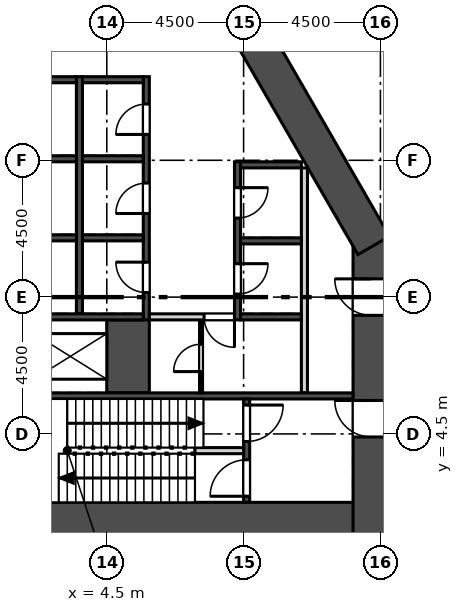
"""IFC4 building model, lengths in metres.
Left out: names, types, materials, properties, quantities, classifications, styles, units other than length and angle.
Written with IfcOpenShell. Run it as: python <this file> out.ifc"""

import sys

from ifc_helpers import new_model, si_unit, direction, frame, frame_2d, origin, place, context, subcontext, project, spatial, rectangle, extrude, element, fill, save


model = new_model("IFC4")
c1 = context("Model", 3, precision=1e-05, world=origin(), true_north=direction((0.0, 1.0)))
c2 = subcontext(c1, "Body", "Model", "MODEL_VIEW")
j1 = project(units=[si_unit("LENGTHUNIT", "METRE"), si_unit("PLANEANGLEUNIT", "RADIAN")], contexts=[c1])
p1 = place(None, origin())
s1 = spatial("IfcSite", under=j1, at=p1, CompositionType="ELEMENT")
p2 = place(p1, origin())
s2 = spatial("IfcBuilding", under=s1, at=p2, CompositionType="ELEMENT")
p3 = place(p2, frame((0.0, 0.0, 132.1)))
s3 = spatial("IfcBuildingStorey", under=s2, at=p3, CompositionType="ELEMENT", Elevation=132.1)
p4 = place(p3, frame((-13.8, 1.65, 0.0), z_axis=(0.0, 0.0, 1.0), x_axis=(1.0, 0.0, 0.0)))
e1 = element("IfcWall", 1, at=p4, inside=s3, PredefinedType="SHEAR", context=c2, shape_type="SweptSolid", body=[
    extrude(rectangle(XDim=27.6, YDim=1.2, at=frame_2d((13.8, 0.0))), origin(), (0.0, 0.0, 1.0), 5.4),
])
p5 = place(p3, frame((13.2, 1.05, 0.0), z_axis=(0.0, 0.0, 1.0), x_axis=(0.0, 1.0, 0.0)))
e2 = element("IfcWall", 2, at=p5, inside=s3, PredefinedType="SHEAR", context=c2, shape_type="SweptSolid", body=[
    extrude(rectangle(XDim=9.949, YDim=1.2, at=frame_2d((4.975, 0.0))), origin(), (0.0, 0.0, 1.0), 5.4),
])
p6 = place(p5, frame((3.35, 0.0, 0.0)))
e3 = element("IfcOpeningElement", 3, at=p6, cuts=e2, PredefinedType="OPENING", context=c2, shape_type="SweptSolid", body=[
    extrude(rectangle(XDim=1.2, YDim=2.1, at=frame_2d((0.6, 1.05))), frame((0.0, 0.61, 0.0), z_axis=(0.0, -1.0, 0.0), x_axis=(1.0, 0.0, 0.0)), (0.0, 0.0, 1.0), 1.22),
])
p7 = place(p5, frame((7.35, 0.0, 0.0)))
e4 = element("IfcOpeningElement", 4, at=p7, cuts=e2, PredefinedType="OPENING", context=c2, shape_type="SweptSolid", body=[
    extrude(rectangle(XDim=1.2, YDim=2.1, at=frame_2d((0.6, 1.05))), frame((0.0, 0.61, 0.0), z_axis=(0.0, -1.0, 0.0), x_axis=(1.0, 0.0, 0.0)), (0.0, 0.0, 1.0), 1.22),
])
p8 = place(p3, frame((13.281, 10.699, 0.0), z_axis=(0.0, 0.0, 1.0), x_axis=(-0.499998513025, 0.866026262288, 0.0)))
e5 = element("IfcWall", 5, at=p8, inside=s3, PredefinedType="SHEAR", context=c2, shape_type="SweptSolid", body=[
    extrude(rectangle(XDim=9.008, YDim=1.2, at=frame_2d((4.504, 0.0))), origin(), (0.0, 0.0, 1.0), 5.4),
])
p9 = place(p3, frame((29.746, 7.709, 0.0), z_axis=(0.0, 0.0, 1.0), x_axis=(-0.500000700546, 0.866024999324, 0.0)))
e6 = element("IfcWall", 6, at=p9, inside=s3, PredefinedType="SOLIDWALL", context=c2, shape_type="SweptSolid", body=[
    extrude(rectangle(XDim=50.787, YDim=0.34, at=frame_2d((25.393, 0.0))), origin(), (0.0, 0.0, 1.0), 5.0),
])
p10 = place(p9, frame((3.197, 0.0, 0.9)))
e7 = element("IfcOpeningElement", 7, at=p10, cuts=e6, PredefinedType="OPENING", context=c2, shape_type="SweptSolid", body=[
    extrude(rectangle(XDim=1.885, YDim=3.0, at=frame_2d((0.942, 1.5))), frame((0.0, 0.18, 0.0), z_axis=(0.0, -1.0, 0.0), x_axis=(1.0, 0.0, 0.0)), (0.0, 0.0, 1.0), 0.36),
])
p11 = place(p9, frame((6.197, 0.0, 0.9)))
e8 = element("IfcOpeningElement", 8, at=p11, cuts=e6, PredefinedType="OPENING", context=c2, shape_type="SweptSolid", body=[
    extrude(rectangle(XDim=1.885, YDim=3.0, at=frame_2d((0.942, 1.5))), frame((0.0, 0.18, 0.0), z_axis=(0.0, -1.0, 0.0), x_axis=(1.0, 0.0, 0.0)), (0.0, 0.0, 1.0), 0.36),
])
p12 = place(p9, frame((9.197, 0.0, 0.9)))
e9 = element("IfcOpeningElement", 9, at=p12, cuts=e6, PredefinedType="OPENING", context=c2, shape_type="SweptSolid", body=[
    extrude(rectangle(XDim=1.885, YDim=3.0, at=frame_2d((0.942, 1.5))), frame((0.0, 0.18, 0.0), z_axis=(0.0, -1.0, 0.0), x_axis=(1.0, 0.0, 0.0)), (0.0, 0.0, 1.0), 0.36),
])
p13 = place(p9, frame((12.197, 0.0, 0.9)))
e10 = element("IfcOpeningElement", 10, at=p13, cuts=e6, PredefinedType="OPENING", context=c2, shape_type="SweptSolid", body=[
    extrude(rectangle(XDim=1.885, YDim=3.0, at=frame_2d((0.942, 1.5))), frame((0.0, 0.18, 0.0), z_axis=(0.0, -1.0, 0.0), x_axis=(1.0, 0.0, 0.0)), (0.0, 0.0, 1.0), 0.36),
])
p14 = place(p9, frame((15.197, 0.0, 0.9)))
e11 = element("IfcOpeningElement", 11, at=p14, cuts=e6, PredefinedType="OPENING", context=c2, shape_type="SweptSolid", body=[
    extrude(rectangle(XDim=1.885, YDim=3.0, at=frame_2d((0.942, 1.5))), frame((0.0, 0.18, 0.0), z_axis=(0.0, -1.0, 0.0), x_axis=(1.0, 0.0, 0.0)), (0.0, 0.0, 1.0), 0.36),
])
p15 = place(p9, frame((18.197, 0.0, 0.9)))
e12 = element("IfcOpeningElement", 12, at=p15, cuts=e6, PredefinedType="OPENING", context=c2, shape_type="SweptSolid", body=[
    extrude(rectangle(XDim=1.885, YDim=3.0, at=frame_2d((0.942, 1.5))), frame((0.0, 0.18, 0.0), z_axis=(0.0, -1.0, 0.0), x_axis=(1.0, 0.0, 0.0)), (0.0, 0.0, 1.0), 0.36),
])
p16 = place(p9, frame((21.197, 0.0, 0.9)))
e13 = element("IfcOpeningElement", 13, at=p16, cuts=e6, PredefinedType="OPENING", context=c2, shape_type="SweptSolid", body=[
    extrude(rectangle(XDim=1.885, YDim=3.0, at=frame_2d((0.942, 1.5))), frame((0.0, 0.18, 0.0), z_axis=(0.0, -1.0, 0.0), x_axis=(1.0, 0.0, 0.0)), (0.0, 0.0, 1.0), 0.36),
])
p17 = place(p9, frame((24.197, 0.0, 0.9)))
e14 = element("IfcOpeningElement", 14, at=p17, cuts=e6, PredefinedType="OPENING", context=c2, shape_type="SweptSolid", body=[
    extrude(rectangle(XDim=1.885, YDim=3.0, at=frame_2d((0.942, 1.5))), frame((0.0, 0.18, 0.0), z_axis=(0.0, -1.0, 0.0), x_axis=(1.0, 0.0, 0.0)), (0.0, 0.0, 1.0), 0.36),
])
p18 = place(p9, frame((27.197, 0.0, 0.9)))
e15 = element("IfcOpeningElement", 15, at=p18, cuts=e6, PredefinedType="OPENING", context=c2, shape_type="SweptSolid", body=[
    extrude(rectangle(XDim=1.885, YDim=3.0, at=frame_2d((0.942, 1.5))), frame((0.0, 0.18, 0.0), z_axis=(0.0, -1.0, 0.0), x_axis=(1.0, 0.0, 0.0)), (0.0, 0.0, 1.0), 0.36),
])
p19 = place(p9, frame((30.197, 0.0, 0.9)))
e16 = element("IfcOpeningElement", 16, at=p19, cuts=e6, PredefinedType="OPENING", context=c2, shape_type="SweptSolid", body=[
    extrude(rectangle(XDim=1.885, YDim=3.0, at=frame_2d((0.942, 1.5))), frame((0.0, 0.18, 0.0), z_axis=(0.0, -1.0, 0.0), x_axis=(1.0, 0.0, 0.0)), (0.0, 0.0, 1.0), 0.36),
])
p20 = place(p9, frame((33.197, 0.0, 0.9)))
e17 = element("IfcOpeningElement", 17, at=p20, cuts=e6, PredefinedType="OPENING", context=c2, shape_type="SweptSolid", body=[
    extrude(rectangle(XDim=1.885, YDim=3.0, at=frame_2d((0.942, 1.5))), frame((0.0, 0.18, 0.0), z_axis=(0.0, -1.0, 0.0), x_axis=(1.0, 0.0, 0.0)), (0.0, 0.0, 1.0), 0.36),
])
p21 = place(p9, frame((36.197, 0.0, 0.9)))
e18 = element("IfcOpeningElement", 18, at=p21, cuts=e6, PredefinedType="OPENING", context=c2, shape_type="SweptSolid", body=[
    extrude(rectangle(XDim=1.885, YDim=3.0, at=frame_2d((0.942, 1.5))), frame((0.0, 0.18, 0.0), z_axis=(0.0, -1.0, 0.0), x_axis=(1.0, 0.0, 0.0)), (0.0, 0.0, 1.0), 0.36),
])
p22 = place(p9, frame((39.197, 0.0, 0.9)))
e19 = element("IfcOpeningElement", 19, at=p22, cuts=e6, PredefinedType="OPENING", context=c2, shape_type="SweptSolid", body=[
    extrude(rectangle(XDim=1.885, YDim=3.0, at=frame_2d((0.942, 1.5))), frame((0.0, 0.18, 0.0), z_axis=(0.0, -1.0, 0.0), x_axis=(1.0, 0.0, 0.0)), (0.0, 0.0, 1.0), 0.36),
])
p23 = place(p9, frame((42.197, 0.0, 0.9)))
e20 = element("IfcOpeningElement", 20, at=p23, cuts=e6, PredefinedType="OPENING", context=c2, shape_type="SweptSolid", body=[
    extrude(rectangle(XDim=1.885, YDim=3.0, at=frame_2d((0.942, 1.5))), frame((0.0, 0.18, 0.0), z_axis=(0.0, -1.0, 0.0), x_axis=(1.0, 0.0, 0.0)), (0.0, 0.0, 1.0), 0.36),
])
p24 = place(p9, frame((45.197, 0.0, 0.9)))
e21 = element("IfcOpeningElement", 21, at=p24, cuts=e6, PredefinedType="OPENING", context=c2, shape_type="SweptSolid", body=[
    extrude(rectangle(XDim=1.885, YDim=3.0, at=frame_2d((0.942, 1.5))), frame((0.0, 0.18, 0.0), z_axis=(0.0, -1.0, 0.0), x_axis=(1.0, 0.0, 0.0)), (0.0, 0.0, 1.0), 0.36),
])
p25 = place(p3, frame((11.0, 5.85, 0.0), z_axis=(0.0, 0.0, 1.0), x_axis=(0.0, 1.0, 0.0)))
e22 = element("IfcWall", 22, at=p25, inside=s3, PredefinedType="SOLIDWALL", context=c2, shape_type="SweptSolid", body=[
    extrude(rectangle(XDim=7.4, YDim=0.2, at=frame_2d((3.7, 0.0))), origin(), (0.0, 0.0, 1.0), 5.0),
])
p26 = place(p3, frame((8.8, 8.25, -0.4), z_axis=(0.0, 0.0, 1.0), x_axis=(0.0, 1.0, 0.0)))
e23 = element("IfcWall", 23, at=p26, inside=s3, PredefinedType="SOLIDWALL", context=c2, shape_type="SweptSolid", body=[
    extrude(rectangle(XDim=5.2, YDim=0.2, at=frame_2d((2.6, 0.0))), origin(), (0.0, 0.0, 1.0), 5.4),
])
p27 = place(p26, frame((0.85, 0.0, 0.4)))
e24 = element("IfcOpeningElement", 24, at=p27, cuts=e23, PredefinedType="OPENING", context=c2, shape_type="SweptSolid", body=[
    extrude(rectangle(XDim=1.0, YDim=2.1, at=frame_2d((0.5, 1.05))), frame((0.0, 0.11, 0.0), z_axis=(0.0, -1.0, 0.0), x_axis=(1.0, 0.0, 0.0)), (0.0, 0.0, 1.0), 0.22),
])
p28 = place(p26, frame((3.35, 0.0, 0.4)))
e25 = element("IfcOpeningElement", 25, at=p28, cuts=e23, PredefinedType="OPENING", context=c2, shape_type="SweptSolid", body=[
    extrude(rectangle(XDim=1.0, YDim=2.1, at=frame_2d((0.5, 1.05))), frame((0.0, 0.11, 0.0), z_axis=(0.0, -1.0, 0.0), x_axis=(1.0, 0.0, 0.0)), (0.0, 0.0, 1.0), 0.22),
])
p29 = place(p3, frame((5.8, 8.25, -0.4), z_axis=(0.0, 0.0, 1.0), x_axis=(0.0, 1.0, 0.0)))
e26 = element("IfcWall", 26, at=p29, inside=s3, PredefinedType="SOLIDWALL", context=c2, shape_type="SweptSolid", body=[
    extrude(rectangle(XDim=8.0, YDim=0.2, at=frame_2d((4.0, 0.0))), origin(), (0.0, 0.0, 1.0), 5.4),
])
p30 = place(p29, frame((0.9, 0.0, 0.4)))
e27 = element("IfcOpeningElement", 27, at=p30, cuts=e26, PredefinedType="OPENING", context=c2, shape_type="SweptSolid", body=[
    extrude(rectangle(XDim=1.0, YDim=2.1, at=frame_2d((0.5, 1.05))), frame((0.0, 0.11, 0.0), z_axis=(0.0, -1.0, 0.0), x_axis=(1.0, 0.0, 0.0)), (0.0, 0.0, 1.0), 0.22),
])
p31 = place(p29, frame((3.5, 0.0, 0.4)))
e28 = element("IfcOpeningElement", 28, at=p31, cuts=e26, PredefinedType="OPENING", context=c2, shape_type="SweptSolid", body=[
    extrude(rectangle(XDim=1.0, YDim=2.1, at=frame_2d((0.5, 1.05))), frame((0.0, 0.11, 0.0), z_axis=(0.0, -1.0, 0.0), x_axis=(1.0, 0.0, 0.0)), (0.0, 0.0, 1.0), 0.22),
])
p32 = place(p29, frame((6.1, 0.0, 0.4)))
e29 = element("IfcOpeningElement", 29, at=p32, cuts=e26, PredefinedType="OPENING", context=c2, shape_type="SweptSolid", body=[
    extrude(rectangle(XDim=1.0, YDim=2.1, at=frame_2d((0.5, 1.05))), frame((0.0, 0.11, 0.0), z_axis=(0.0, -1.0, 0.0), x_axis=(1.0, 0.0, 0.0)), (0.0, 0.0, 1.0), 0.22),
])
p33 = place(p3, frame((3.6, 8.45, -0.4), z_axis=(0.0, 0.0, 1.0), x_axis=(0.0, 1.0, 0.0)))
e30 = element("IfcWall", 30, at=p33, inside=s3, PredefinedType="SOLIDWALL", context=c2, shape_type="SweptSolid", body=[
    extrude(rectangle(XDim=7.8, YDim=0.2, at=frame_2d((3.9, 0.0))), origin(), (0.0, 0.0, 1.0), 5.4),
])
p34 = place(p3, frame((5.2, 5.85, -0.4), z_axis=(0.0, 0.0, 1.0), x_axis=(0.0, 1.0, 0.0)))
e31 = element("IfcWall", 31, at=p34, inside=s3, PredefinedType="SOLIDWALL", context=c2, shape_type="SweptSolid", body=[
    extrude(rectangle(XDim=2.4, YDim=1.4, at=frame_2d((1.2, 0.0))), origin(), (0.0, 0.0, 1.0), 5.4),
])
p35 = place(p3, frame((8.9, 8.35, -0.4), z_axis=(0.0, 0.0, 1.0), x_axis=(1.0, 0.0, 0.0)))
e32 = element("IfcWall", 32, at=p35, inside=s3, PredefinedType="SOLIDWALL", context=c2, shape_type="SweptSolid", body=[
    extrude(rectangle(XDim=2.0, YDim=0.2, at=frame_2d((1.0, 0.0))), origin(), (0.0, 0.0, 1.0), 5.4),
])
p36 = place(p3, frame((1.5, 8.35, -0.4), z_axis=(0.0, 0.0, 1.0), x_axis=(1.0, 0.0, 0.0)))
e33 = element("IfcWall", 33, at=p36, inside=s3, PredefinedType="SOLIDWALL", context=c2, shape_type="SweptSolid", body=[
    extrude(rectangle(XDim=4.2, YDim=0.2, at=frame_2d((2.1, 0.0))), origin(), (0.0, 0.0, 1.0), 5.4),
])
p37 = place(p3, frame((1.2, 5.75, -0.4), z_axis=(0.0, 0.0, 1.0), x_axis=(1.0, 0.0, 0.0)))
e34 = element("IfcWall", 34, at=p37, inside=s3, PredefinedType="SOLIDWALL", context=c2, shape_type="SweptSolid", body=[
    extrude(rectangle(XDim=11.4, YDim=0.2, at=frame_2d((5.7, 0.0))), origin(), (0.0, 0.0, 1.0), 5.4),
])
p38 = place(p3, frame((9.1, 2.25, -0.4), z_axis=(0.0, 0.0, 1.0), x_axis=(0.0, 1.0, 0.0)))
e35 = element("IfcWall", 35, at=p38, inside=s3, PredefinedType="SOLIDWALL", context=c2, shape_type="SweptSolid", body=[
    extrude(rectangle(XDim=3.4, YDim=0.2, at=frame_2d((1.7, 0.0))), origin(), (0.0, 0.0, 1.0), 5.4),
])
p39 = place(p38, frame((0.2, 0.0, 0.4)))
e36 = element("IfcOpeningElement", 36, at=p39, cuts=e35, PredefinedType="OPENING", context=c2, shape_type="SweptSolid", body=[
    extrude(rectangle(XDim=1.2, YDim=2.1, at=frame_2d((0.6, 1.05))), frame((0.0, 0.11, 0.0), z_axis=(0.0, -1.0, 0.0), x_axis=(1.0, 0.0, 0.0)), (0.0, 0.0, 1.0), 0.22),
])
p40 = place(p38, frame((2.0, 0.0, 0.4)))
e37 = element("IfcOpeningElement", 37, at=p40, cuts=e35, PredefinedType="OPENING", context=c2, shape_type="SweptSolid", body=[
    extrude(rectangle(XDim=1.2, YDim=2.1, at=frame_2d((0.6, 1.05))), frame((0.0, 0.11, 0.0), z_axis=(0.0, -1.0, 0.0), x_axis=(1.0, 0.0, 0.0)), (0.0, 0.0, 1.0), 0.22),
])
for number, where, z_axis, x_axis in (
    (38, (8.9, 10.85, -0.4), (0.0, 0.0, 1.0), (1.0, 0.0, 0.0)),
    (39, (8.9, 13.35, -0.4), (0.0, 0.0, 1.0), (1.0, 0.0, 0.0)),
    (40, (3.7, 10.95, -0.4), (0.0, 0.0, 1.0), (1.0, 0.0, 0.0)),
    (41, (3.7, 13.55, -0.4), (0.0, 0.0, 1.0), (1.0, 0.0, 0.0)),
    (42, (3.7, 16.15, -0.4), (0.0, 0.0, 1.0), (1.0, 0.0, 0.0)),
    (43, (1.5, 10.95, -0.4), (0.0, 0.0, 1.0), (1.0, 0.0, 0.0)),
    (44, (1.5, 13.55, -0.4), (0.0, 0.0, 1.0), (1.0, 0.0, 0.0)),
    (45, (1.5, 16.15, -0.4), (0.0, 0.0, 1.0), (1.0, 0.0, 0.0)),
):
    element("IfcWall", number, at=place(p3, frame(where, z_axis=z_axis, x_axis=x_axis)), inside=s3, PredefinedType="SOLIDWALL", context=c2, shape_type="SweptSolid", body=[
        extrude(rectangle(XDim=2.0, YDim=0.2, at=frame_2d((1.0, 0.0))), origin(), (0.0, 0.0, 1.0), 5.4),
    ])
p41 = place(p3, frame((7.6, 5.85, 0.0), z_axis=(0.0, 0.0, 1.0), x_axis=(0.0, 1.0, 0.0)))
e46 = element("IfcWall", 46, at=p41, inside=s3, PredefinedType="PARTITIONING", context=c2, shape_type="SweptSolid", body=[
    extrude(rectangle(XDim=2.4, YDim=0.1, at=frame_2d((1.2, 0.0))), origin(), (0.0, 0.0, 1.0), 5.0),
])
p42 = place(p41, frame((0.7, 0.0, 0.0)))
e47 = element("IfcOpeningElement", 47, at=p42, cuts=e46, PredefinedType="OPENING", context=c2, shape_type="SweptSolid", body=[
    extrude(rectangle(XDim=0.9, YDim=2.1, at=frame_2d((0.45, 1.05))), frame((0.0, 0.06, 0.0), z_axis=(0.0, -1.0, 0.0), x_axis=(1.0, 0.0, 0.0)), (0.0, 0.0, 1.0), 0.12),
])
p43 = place(p3, frame((5.9, 8.35, 0.0), z_axis=(0.0, 0.0, 1.0), x_axis=(1.0, 0.0, 0.0)))
e48 = element("IfcWall", 48, at=p43, inside=s3, PredefinedType="SOLIDWALL", context=c2, shape_type="SweptSolid", body=[
    extrude(rectangle(XDim=2.8, YDim=0.2, at=frame_2d((1.4, 0.0))), origin(), (0.0, 0.0, 1.0), 5.0),
])
p44 = place(p43, frame((1.8, 0.0, 0.0)))
e49 = element("IfcOpeningElement", 49, at=p44, cuts=e48, PredefinedType="OPENING", context=c2, shape_type="SweptSolid", body=[
    extrude(rectangle(XDim=1.0, YDim=2.1, at=frame_2d((0.5, 1.05))), frame((0.0, 0.11, 0.0), z_axis=(0.0, -1.0, 0.0), x_axis=(1.0, 0.0, 0.0)), (0.0, 0.0, 1.0), 0.22),
])
p45 = place(p3, frame((7.4, 3.95, 0.0), z_axis=(0.0, 0.0, 1.0), x_axis=(1.0, 0.0, 0.0)))
e50 = element("IfcWall", 50, at=p45, inside=s3, PredefinedType="SOLIDWALL", context=c2, shape_type="SweptSolid", body=[
    extrude(rectangle(XDim=1.6, YDim=0.2, at=frame_2d((0.8, 0.0))), origin(), (0.0, 0.0, 1.0), 5.0),
])
p46 = place(p3, frame((11.621, 22.474, 0.0), z_axis=(0.0, 0.0, 1.0), x_axis=(0.499991059272, -0.866030565655, 0.0)))
e51 = element("IfcWall", 51, at=p46, inside=s3, PredefinedType="SOLIDWALL", context=c2, shape_type="SweptSolid", body=[
    extrude(rectangle(XDim=11.854, YDim=0.3, at=frame_2d((5.927, 0.0))), origin(), (0.0, 0.0, 1.0), 5.0),
])
p47 = place(p27, frame((1.0, 0.0, 0.0), z_axis=(0.0, 0.0, 1.0), x_axis=(-1.0, 0.0, 0.0)))
e52 = element("IfcDoor", 52, at=p47, inside=s3, OperationType="SINGLE_SWING_LEFT", PredefinedType="DOOR", context=c2, shape_type="SweptSolid", body=[
    extrude(rectangle(XDim=1.0, YDim=2.1, at=frame_2d((0.5, 1.05))), frame((0.0, 0.025, 0.0), z_axis=(0.0, -1.0, 0.0), x_axis=(1.0, 0.0, 0.0)), (0.0, 0.0, 1.0), 0.05),
])
fill(e24, e52)
p48 = place(p28, frame((1.0, 0.0, 0.0), z_axis=(0.0, 0.0, 1.0), x_axis=(-1.0, 0.0, 0.0)))
e53 = element("IfcDoor", 53, at=p48, inside=s3, OperationType="SINGLE_SWING_LEFT", PredefinedType="DOOR", context=c2, shape_type="SweptSolid", body=[
    extrude(rectangle(XDim=1.0, YDim=2.1, at=frame_2d((0.5, 1.05))), frame((0.0, 0.025, 0.0), z_axis=(0.0, -1.0, 0.0), x_axis=(1.0, 0.0, 0.0)), (0.0, 0.0, 1.0), 0.05),
])
fill(e25, e53)
p49 = place(p30, origin())
e54 = element("IfcDoor", 54, at=p49, inside=s3, OperationType="SINGLE_SWING_RIGHT", PredefinedType="DOOR", context=c2, shape_type="SweptSolid", body=[
    extrude(rectangle(XDim=1.0, YDim=2.1, at=frame_2d((0.5, 1.05))), frame((0.0, 0.025, 0.0), z_axis=(0.0, -1.0, 0.0), x_axis=(1.0, 0.0, 0.0)), (0.0, 0.0, 1.0), 0.05),
])
fill(e27, e54)
p50 = place(p31, origin())
e55 = element("IfcDoor", 55, at=p50, inside=s3, OperationType="SINGLE_SWING_LEFT", PredefinedType="DOOR", context=c2, shape_type="SweptSolid", body=[
    extrude(rectangle(XDim=1.0, YDim=2.1, at=frame_2d((0.5, 1.05))), frame((0.0, 0.025, 0.0), z_axis=(0.0, -1.0, 0.0), x_axis=(1.0, 0.0, 0.0)), (0.0, 0.0, 1.0), 0.05),
])
fill(e28, e55)
p51 = place(p32, origin())
e56 = element("IfcDoor", 56, at=p51, inside=s3, OperationType="SINGLE_SWING_LEFT", PredefinedType="DOOR", context=c2, shape_type="SweptSolid", body=[
    extrude(rectangle(XDim=1.0, YDim=2.1, at=frame_2d((0.5, 1.05))), frame((0.0, 0.025, 0.0), z_axis=(0.0, -1.0, 0.0), x_axis=(1.0, 0.0, 0.0)), (0.0, 0.0, 1.0), 0.05),
])
fill(e29, e56)
p52 = place(p44, frame((1.0, 0.0, 0.0), z_axis=(0.0, 0.0, 1.0), x_axis=(-1.0, 0.0, 0.0)))
e57 = element("IfcDoor", 57, at=p52, inside=s3, OperationType="SINGLE_SWING_LEFT", PredefinedType="DOOR", context=c2, shape_type="SweptSolid", body=[
    extrude(rectangle(XDim=1.0, YDim=2.1, at=frame_2d((0.5, 1.05))), frame((0.0, 0.025, 0.0), z_axis=(0.0, -1.0, 0.0), x_axis=(1.0, 0.0, 0.0)), (0.0, 0.0, 1.0), 0.05),
])
fill(e49, e57)
p53 = place(p42, origin())
e58 = element("IfcDoor", 58, at=p53, inside=s3, OperationType="SINGLE_SWING_LEFT", PredefinedType="DOOR", context=c2, shape_type="SweptSolid", body=[
    extrude(rectangle(XDim=0.9, YDim=2.1, at=frame_2d((0.45, 1.05))), frame((0.0, 0.025, 0.0), z_axis=(0.0, -1.0, 0.0), x_axis=(1.0, 0.0, 0.0)), (0.0, 0.0, 1.0), 0.05),
])
fill(e47, e58)
p54 = place(p6, origin())
e59 = element("IfcDoor", 59, at=p54, inside=s3, OperationType="SINGLE_SWING_RIGHT", PredefinedType="DOOR", context=c2, shape_type="SweptSolid", body=[
    extrude(rectangle(XDim=1.2, YDim=2.1, at=frame_2d((0.6, 1.05))), frame((0.0, 0.025, 0.0), z_axis=(0.0, -1.0, 0.0), x_axis=(1.0, 0.0, 0.0)), (0.0, 0.0, 1.0), 0.05),
])
fill(e3, e59)
p55 = place(p39, origin())
e60 = element("IfcDoor", 60, at=p55, inside=s3, OperationType="SINGLE_SWING_LEFT", PredefinedType="DOOR", context=c2, shape_type="SweptSolid", body=[
    extrude(rectangle(XDim=1.2, YDim=2.1, at=frame_2d((0.6, 1.05))), frame((0.0, 0.025, 0.0), z_axis=(0.0, -1.0, 0.0), x_axis=(1.0, 0.0, 0.0)), (0.0, 0.0, 1.0), 0.05),
])
fill(e36, e60)
p56 = place(p7, origin())
e61 = element("IfcDoor", 61, at=p56, inside=s3, OperationType="SINGLE_SWING_RIGHT", PredefinedType="DOOR", context=c2, shape_type="SweptSolid", body=[
    extrude(rectangle(XDim=1.2, YDim=2.1, at=frame_2d((0.6, 1.05))), frame((0.0, 0.025, 0.0), z_axis=(0.0, -1.0, 0.0), x_axis=(1.0, 0.0, 0.0)), (0.0, 0.0, 1.0), 0.05),
])
fill(e4, e61)
p57 = place(p40, frame((1.2, 0.0, 0.0), z_axis=(0.0, 0.0, 1.0), x_axis=(-1.0, 0.0, 0.0)))
e62 = element("IfcDoor", 62, at=p57, inside=s3, OperationType="SINGLE_SWING_LEFT", PredefinedType="DOOR", context=c2, shape_type="SweptSolid", body=[
    extrude(rectangle(XDim=1.2, YDim=2.1, at=frame_2d((0.6, 1.05))), frame((0.0, 0.025, 0.0), z_axis=(0.0, -1.0, 0.0), x_axis=(1.0, 0.0, 0.0)), (0.0, 0.0, 1.0), 0.05),
])
fill(e37, e62)
save(model, sys.argv[1])
